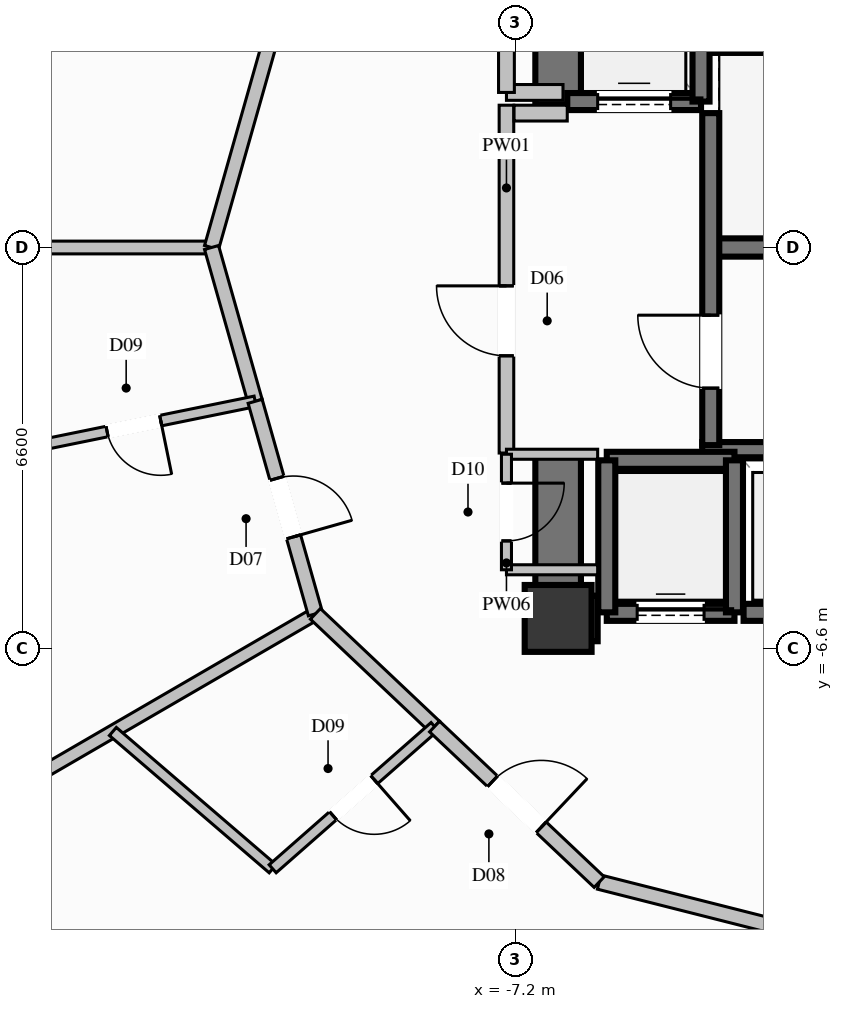
"""IFC4 building model, lengths in metres.
Left out: names, types, materials, properties, quantities, classifications, styles, units other than length and angle.
Written with IfcOpenShell. Run it as: python <this file> out.ifc"""

import sys

from ifc_helpers import new_model, si_unit, direction, frame, frame_2d, origin, origin_2d, place, context, subcontext, project, spatial, rectangle, extrude, element, fill, save


model = new_model("IFC4")
c1 = context("Model", 3, precision=1e-05, world=origin(), true_north=direction((0.0, 1.0)))
c2 = subcontext(c1, "Body", "Model", "MODEL_VIEW")
j1 = project(units=[si_unit("LENGTHUNIT", "METRE"), si_unit("PLANEANGLEUNIT", "RADIAN")], contexts=[c1])
p1 = place(None, origin())
s1 = spatial("IfcSite", under=j1, at=p1, CompositionType="ELEMENT")
p2 = place(p1, origin())
s2 = spatial("IfcBuilding", under=s1, at=p2, CompositionType="ELEMENT")
p3 = place(p2, frame((0.0, 0.0, 42.8)))
s3 = spatial("IfcBuildingStorey", under=s2, at=p3, CompositionType="ELEMENT", Elevation=42.8)
p4 = place(p3, frame((-6.5, -6.1, 0.0), z_axis=(0.0, 0.0, 1.0), x_axis=(1.0, 0.0, 0.0)))
e1 = element("IfcColumn", 1, at=p4, inside=s3, PredefinedType="COLUMN", context=c2, shape_type="SweptSolid", body=[
    extrude(rectangle(XDim=1.1, YDim=1.1, at=origin_2d()), origin(), (0.0, 0.0, 1.0), 3.6),
])
p5 = place(p3, frame((-3.99, 0.0, 0.0), z_axis=(0.0, 0.0, 1.0), x_axis=(1.0, 0.0, 0.0)))
e2 = element("IfcWall", 2, at=p5, inside=s3, PredefinedType="SHEAR", context=c2, shape_type="SweptSolid", body=[
    extrude(rectangle(XDim=7.98, YDim=0.3, at=frame_2d((3.99, 0.0))), origin(), (0.0, 0.0, 1.0), 3.6),
])
for number, where, z_axis, x_axis in (
    (3, (-4.13, -3.325, 0.0), (0.0, 0.0, 1.0), (1.0, 0.0, 0.0)),
    (4, (-4.13, 3.325, 0.0), (0.0, 0.0, 1.0), (1.0, 0.0, 0.0)),
):
    element("IfcWall", number, at=place(p3, frame(where, z_axis=z_axis, x_axis=x_axis)), inside=s3, PredefinedType="SOLIDWALL", context=c2, shape_type="SweptSolid", body=[
        extrude(rectangle(XDim=8.26, YDim=0.25, at=frame_2d((4.13, 0.0))), origin(), (0.0, 0.0, 1.0), 3.6),
    ])
p6 = place(p3, frame((-6.125, -6.1, 0.0), z_axis=(0.0, 0.0, 1.0), x_axis=(1.0, 0.0, 0.0)))
e5 = element("IfcWall", 5, at=p6, inside=s3, PredefinedType="SHEAR", context=c2, shape_type="SweptSolid", body=[
    extrude(rectangle(XDim=0.275, YDim=0.75, at=frame_2d((0.137, 0.0))), origin(), (0.0, 0.0, 1.0), 3.6),
])
p7 = place(p3, frame((-6.5, 2.35, 0.0), z_axis=(0.0, 0.0, 1.0), x_axis=(0.0, 1.0, 0.0)))
e6 = element("IfcWall", 6, at=p7, inside=s3, PredefinedType="SHEAR", context=c2, shape_type="SweptSolid", body=[
    extrude(rectangle(XDim=4.125, YDim=0.75, at=frame_2d((2.062, 0.0))), origin(), (0.0, 0.0, 1.0), 3.6),
])
p8 = place(p3, frame((-6.5, -6.475, 0.0), z_axis=(0.0, 0.0, 1.0), x_axis=(0.0, 1.0, 0.0)))
e7 = element("IfcWall", 7, at=p8, inside=s3, PredefinedType="SHEAR", context=c2, shape_type="SweptSolid", body=[
    extrude(rectangle(XDim=3.125, YDim=0.75, at=frame_2d((1.562, 0.0))), origin(), (0.0, 0.0, 1.0), 3.6),
])
p9 = place(p3, frame((-5.7, -6.0, 0.0), z_axis=(0.0, 0.0, 1.0), x_axis=(1.0, 0.0, 0.0)))
e8 = element("IfcWall", 8, at=p9, inside=s3, PredefinedType="SOLIDWALL", context=c2, shape_type="SweptSolid", body=[
    extrude(rectangle(XDim=2.1, YDim=0.28, at=frame_2d((1.05, 0.0))), origin(), (0.0, 0.0, 1.0), 3.34),
])
p10 = place(p9, frame((0.5, 0.0, 0.0)))
e9 = element("IfcOpeningElement", 9, at=p10, cuts=e8, PredefinedType="OPENING", context=c2, shape_type="SweptSolid", body=[
    extrude(rectangle(XDim=1.1, YDim=2.2, at=frame_2d((0.55, 1.1))), frame((0.0, 0.15, 0.0), z_axis=(0.0, -1.0, 0.0), x_axis=(1.0, 0.0, 0.0)), (0.0, 0.0, 1.0), 0.3),
])
p11 = place(p3, frame((-3.6, -3.5, 0.0), z_axis=(0.0, 0.0, 1.0), x_axis=(-1.0, 0.0, 0.0)))
e10 = element("IfcWall", 10, at=p11, inside=s3, PredefinedType="SOLIDWALL", context=c2, shape_type="SweptSolid", body=[
    extrude(rectangle(XDim=2.1, YDim=0.28, at=frame_2d((1.05, 0.0))), origin(), (0.0, 0.0, 1.0), 3.34),
])
for number, where, z_axis, x_axis in (
    (11, (-5.7, -3.5, 0.0), (0.0, 0.0, 1.0), (0.0, -1.0, 0.0)),
    (12, (-3.6, -6.0, 0.0), (0.0, 0.0, 1.0), (0.0, 1.0, 0.0)),
):
    element("IfcWall", number, at=place(p3, frame(where, z_axis=z_axis, x_axis=x_axis)), inside=s3, PredefinedType="SOLIDWALL", context=c2, shape_type="SweptSolid", body=[
        extrude(rectangle(XDim=2.5, YDim=0.28, at=frame_2d((1.25, 0.0))), origin(), (0.0, 0.0, 1.0), 3.34),
    ])
p12 = place(p3, frame((-3.45, -6.0, 0.0), z_axis=(0.0, 0.0, 1.0), x_axis=(1.0, 0.0, 0.0)))
e13 = element("IfcWall", 13, at=p12, inside=s3, PredefinedType="SOLIDWALL", context=c2, shape_type="SweptSolid", body=[
    extrude(rectangle(XDim=2.1, YDim=0.28, at=frame_2d((1.05, 0.0))), origin(), (0.0, 0.0, 1.0), 3.34),
])
p13 = place(p12, frame((0.5, 0.0, 0.0)))
e14 = element("IfcOpeningElement", 14, at=p13, cuts=e13, PredefinedType="OPENING", context=c2, shape_type="SweptSolid", body=[
    extrude(rectangle(XDim=1.1, YDim=2.2, at=frame_2d((0.55, 1.1))), frame((0.0, 0.15, 0.0), z_axis=(0.0, -1.0, 0.0), x_axis=(1.0, 0.0, 0.0)), (0.0, 0.0, 1.0), 0.3),
])
p14 = place(p3, frame((-6.35, 2.4, 0.0), z_axis=(0.0, 0.0, 1.0), x_axis=(1.0, 0.0, 0.0)))
e15 = element("IfcWall", 15, at=p14, inside=s3, PredefinedType="SOLIDWALL", context=c2, shape_type="SweptSolid", body=[
    extrude(rectangle(XDim=2.2, YDim=0.28, at=frame_2d((1.1, 0.0))), origin(), (0.0, 0.0, 1.0), 3.34),
])
p15 = place(p14, frame((0.5, 0.0, 0.0)))
e16 = element("IfcOpeningElement", 16, at=p15, cuts=e15, PredefinedType="OPENING", context=c2, shape_type="SweptSolid", body=[
    extrude(rectangle(XDim=1.2, YDim=2.2, at=frame_2d((0.6, 1.1))), frame((0.0, 0.15, 0.0), z_axis=(0.0, -1.0, 0.0), x_axis=(1.0, 0.0, 0.0)), (0.0, 0.0, 1.0), 0.3),
])
p16 = place(p3, frame((-4.15, 2.4, 0.0), z_axis=(0.0, 0.0, 1.0), x_axis=(0.0, 1.0, 0.0)))
e17 = element("IfcWall", 17, at=p16, inside=s3, PredefinedType="SOLIDWALL", context=c2, shape_type="SweptSolid", body=[
    extrude(rectangle(XDim=2.7, YDim=0.28, at=frame_2d((1.35, 0.0))), origin(), (0.0, 0.0, 1.0), 3.34),
])
p17 = place(p3, frame((-3.99, -3.25, 0.0), z_axis=(0.0, 0.0, 1.0), x_axis=(0.0, 1.0, 0.0)))
e18 = element("IfcWall", 18, at=p17, inside=s3, PredefinedType="SOLIDWALL", context=c2, shape_type="SweptSolid", body=[
    extrude(rectangle(XDim=5.46, YDim=0.28, at=frame_2d((2.73, 0.0))), origin(), (0.0, 0.0, 1.0), 3.34),
])
p18 = place(p17, frame((0.937, 0.0, 0.0)))
e19 = element("IfcOpeningElement", 19, at=p18, cuts=e18, PredefinedType="OPENING", context=c2, shape_type="SweptSolid", body=[
    extrude(rectangle(XDim=1.2, YDim=2.2, at=frame_2d((0.6, 1.1))), frame((0.0, 0.15, 0.0), z_axis=(0.0, -1.0, 0.0), x_axis=(1.0, 0.0, 0.0)), (0.0, 0.0, 1.0), 0.3),
])
p19 = place(p3, frame((-7.35, -3.38, 0.0), z_axis=(0.0, 0.0, 1.0), x_axis=(0.0, 1.0, 0.0)))
e20 = element("IfcWall", 20, at=p19, inside=s3, PredefinedType="PARTITIONING", context=c2, shape_type="SweptSolid", body=[
    extrude(rectangle(XDim=5.72, YDim=0.24, at=frame_2d((2.86, 0.0))), origin(), (0.0, 0.0, 1.0), 2.425),
])
p20 = place(p19, frame((1.599, 0.0, 0.0)))
e21 = element("IfcOpeningElement", 21, at=p20, cuts=e20, PredefinedType="OPENING", context=c2, shape_type="SweptSolid", body=[
    extrude(rectangle(XDim=1.15, YDim=2.2, at=frame_2d((0.575, 1.1))), frame((0.0, 0.13, 0.0), z_axis=(0.0, -1.0, 0.0), x_axis=(1.0, 0.0, 0.0)), (0.0, 0.0, 1.0), 0.26),
])
p21 = place(p3, frame((-7.225, 2.21, 0.0), z_axis=(0.0, 0.0, 1.0), x_axis=(1.0, 0.0, 0.0)))
e22 = element("IfcWall", 22, at=p21, inside=s3, PredefinedType="PARTITIONING", context=c2, shape_type="SweptSolid", body=[
    extrude(rectangle(XDim=0.875, YDim=0.26, at=frame_2d((0.438, 0.0))), origin(), (0.0, 0.0, 1.0), 3.34),
])
p22 = place(p3, frame((-7.35, 2.55, 0.0), z_axis=(0.0, 0.0, 1.0), x_axis=(1.0, 0.0, 0.0)))
e23 = element("IfcWall", 23, at=p22, inside=s3, PredefinedType="PARTITIONING", context=c2, shape_type="SweptSolid", body=[
    extrude(rectangle(XDim=0.93, YDim=0.26, at=frame_2d((0.465, 0.0))), origin(), (0.0, 0.0, 1.0), 3.34),
])
p23 = place(p3, frame((-7.35, 2.55, 0.0), z_axis=(0.0, 0.0, 1.0), x_axis=(0.0, 1.0, 0.0)))
e24 = element("IfcWall", 24, at=p23, inside=s3, PredefinedType="PARTITIONING", context=c2, shape_type="SweptSolid", body=[
    extrude(rectangle(XDim=2.4, YDim=0.26, at=frame_2d((1.2, 0.0))), origin(), (0.0, 0.0, 1.0), 2.425),
])
p24 = place(p23, frame((0.775, 0.0, 0.0)))
e25 = element("IfcOpeningElement", 25, at=p24, cuts=e24, PredefinedType="OPENING", context=c2, shape_type="SweptSolid", body=[
    extrude(rectangle(XDim=0.85, YDim=2.05, at=frame_2d((0.425, 1.025))), frame((0.0, 0.14, 0.0), z_axis=(0.0, -1.0, 0.0), x_axis=(1.0, 0.0, 0.0)), (0.0, 0.0, 1.0), 0.28),
])
p25 = place(p3, frame((-7.35, -5.3, 0.0), z_axis=(0.0, 0.0, 1.0), x_axis=(1.0, 0.0, 0.0)))
e26 = element("IfcWall", 26, at=p25, inside=s3, PredefinedType="PARTITIONING", context=c2, shape_type="SweptSolid", body=[
    extrude(rectangle(XDim=1.5, YDim=0.165, at=frame_2d((0.75, 0.0))), origin(), (0.0, 0.0, 1.0), 2.425),
])
p26 = place(p3, frame((-5.85, -3.4, 0.0), z_axis=(0.0, 0.0, 1.0), x_axis=(-1.0, 0.0, 0.0)))
e27 = element("IfcWall", 27, at=p26, inside=s3, PredefinedType="PARTITIONING", context=c2, shape_type="SweptSolid", body=[
    extrude(rectangle(XDim=1.5, YDim=0.165, at=frame_2d((0.75, 0.0))), origin(), (0.0, 0.0, 1.0), 3.34),
])
p27 = place(p3, frame((-7.35, -3.4, 0.0), z_axis=(0.0, 0.0, 1.0), x_axis=(0.0, -1.0, 0.0)))
e28 = element("IfcWall", 28, at=p27, inside=s3, PredefinedType="PARTITIONING", context=c2, shape_type="SweptSolid", body=[
    extrude(rectangle(XDim=1.9, YDim=0.165, at=frame_2d((0.95, 0.0))), origin(), (0.0, 0.0, 1.0), 3.34),
])
p28 = place(p27, frame((0.475, 0.0, 0.0)))
e29 = element("IfcOpeningElement", 29, at=p28, cuts=e28, PredefinedType="OPENING", context=c2, shape_type="SweptSolid", body=[
    extrude(rectangle(XDim=0.95, YDim=2.1, at=frame_2d((0.475, 1.05))), frame((0.0, 0.093, 0.0), z_axis=(0.0, -1.0, 0.0), x_axis=(1.0, 0.0, 0.0)), (0.0, 0.0, 1.0), 0.185),
])
p29 = place(p3, frame((-12.2, 0.0, 0.0), z_axis=(0.0, 0.0, 1.0), x_axis=(-1.0, 0.0, 0.0)))
e30 = element("IfcWall", 30, at=p29, inside=s3, PredefinedType="PARTITIONING", context=c2, shape_type="SweptSolid", body=[
    extrude(rectangle(XDim=5.78, YDim=0.21, at=frame_2d((2.89, 0.0))), origin(), (0.0, 0.0, 1.0), 2.708),
])
p30 = place(p3, frame((-10.492, -6.025, 0.0), z_axis=(0.0, 0.0, 1.0), x_axis=(-0.86478894661, -0.502135517387, 0.0)))
e31 = element("IfcWall", 31, at=p30, inside=s3, PredefinedType="PARTITIONING", context=c2, shape_type="SweptSolid", body=[
    extrude(rectangle(XDim=5.881, YDim=0.21, at=frame_2d((2.94, 0.0))), origin(), (0.0, 0.0, 1.0), 2.708),
])
p31 = place(p3, frame((-10.492, 6.025, 0.0), z_axis=(0.0, 0.0, 1.0), x_axis=(-0.272743314702, -0.962086838225, 0.0)))
e32 = element("IfcWall", 32, at=p31, inside=s3, PredefinedType="PARTITIONING", context=c2, shape_type="SweptSolid", body=[
    extrude(rectangle(XDim=6.262, YDim=0.24, at=frame_2d((3.131, 0.0))), origin(), (0.0, 0.0, 1.0), 3.34),
])
p32 = place(p3, frame((-12.2, 0.0, 0.0), z_axis=(0.0, 0.0, 1.0), x_axis=(0.272672757197, -0.962106837873, 0.0)))
e33 = element("IfcWall", 33, at=p32, inside=s3, PredefinedType="PARTITIONING", context=c2, shape_type="SweptSolid", body=[
    extrude(rectangle(XDim=2.63, YDim=0.24, at=frame_2d((1.315, 0.0))), origin(), (0.0, 0.0, 1.0), 3.34),
])
p33 = place(p3, frame((-11.483, -2.53, 0.0), z_axis=(0.0, 0.0, 1.0), x_axis=(-0.979847207533, -0.19974846655, 0.0)))
e34 = element("IfcWall", 34, at=p33, inside=s3, PredefinedType="PLUMBINGWALL", context=c2, shape_type="SweptSolid", body=[
    extrude(rectangle(XDim=4.07, YDim=0.175, at=frame_2d((2.035, 0.0))), origin(), (0.0, 0.0, 1.0), 3.34),
])
p34 = place(p33, frame((1.585, 0.0, 0.0)))
e35 = element("IfcOpeningElement", 35, at=p34, cuts=e34, PredefinedType="OPENING", context=c2, shape_type="SweptSolid", body=[
    extrude(rectangle(XDim=0.9, YDim=2.1, at=frame_2d((0.45, 1.05))), frame((0.0, 0.098, 0.0), z_axis=(0.0, -1.0, 0.0), x_axis=(1.0, 0.0, 0.0)), (0.0, 0.0, 1.0), 0.195),
])
p35 = place(p3, frame((-11.483, -2.53, 0.0), z_axis=(0.0, 0.0, 1.0), x_axis=(0.272794390365, -0.96207235725, 0.0)))
e36 = element("IfcWall", 36, at=p35, inside=s3, PredefinedType="PARTITIONING", context=c2, shape_type="SweptSolid", body=[
    extrude(rectangle(XDim=3.633, YDim=0.24, at=frame_2d((1.816, 0.0))), origin(), (0.0, 0.0, 1.0), 3.34),
])
p36 = place(p35, frame((1.316, 0.0, 0.0)))
e37 = element("IfcOpeningElement", 37, at=p36, cuts=e36, PredefinedType="OPENING", context=c2, shape_type="SweptSolid", body=[
    extrude(rectangle(XDim=1.0, YDim=2.2, at=frame_2d((0.5, 1.1))), frame((0.0, 0.13, 0.0), z_axis=(0.0, -1.0, 0.0), x_axis=(1.0, 0.0, 0.0)), (0.0, 0.0, 1.0), 0.26),
])
p37 = place(p3, frame((-10.492, -6.025, 0.0), z_axis=(0.0, 0.0, 1.0), x_axis=(0.726651583854, -0.687006168591, 0.0)))
e38 = element("IfcWall", 38, at=p37, inside=s3, PredefinedType="PARTITIONING", context=c2, shape_type="SweptSolid", body=[
    extrude(rectangle(XDim=2.697, YDim=0.24, at=frame_2d((1.349, 0.0))), origin(), (0.0, 0.0, 1.0), 3.34),
])
p38 = place(p3, frame((-13.823, -7.959, 0.0), z_axis=(0.0, 0.0, 1.0), x_axis=(0.758465196679, -0.65171354553, 0.0)))
e39 = element("IfcWall", 39, at=p38, inside=s3, PredefinedType="PLUMBINGWALL", context=c2, shape_type="SweptSolid", body=[
    extrude(rectangle(XDim=3.465, YDim=0.175, at=frame_2d((1.732, 0.0))), origin(), (0.0, 0.0, 1.0), 3.34),
])
p39 = place(p3, frame((-8.532, -7.878, 0.0), z_axis=(0.0, 0.0, 1.0), x_axis=(-0.751329434658, -0.6599273298, 0.0)))
e40 = element("IfcWall", 40, at=p39, inside=s3, PredefinedType="PLUMBINGWALL", context=c2, shape_type="SweptSolid", body=[
    extrude(rectangle(XDim=3.544, YDim=0.175, at=frame_2d((1.772, 0.0))), origin(), (0.0, 0.0, 1.0), 3.34),
])
p40 = place(p39, frame((1.322, 0.0, 0.0)))
e41 = element("IfcOpeningElement", 41, at=p40, cuts=e40, PredefinedType="OPENING", context=c2, shape_type="SweptSolid", body=[
    extrude(rectangle(XDim=0.9, YDim=2.1, at=frame_2d((0.45, 1.05))), frame((0.0, 0.098, 0.0), z_axis=(0.0, -1.0, 0.0), x_axis=(1.0, 0.0, 0.0)), (0.0, 0.0, 1.0), 0.195),
])
p41 = place(p3, frame((-5.825, -10.436, 0.0), z_axis=(0.0, 0.0, 1.0), x_axis=(0.969413132073, -0.245434674331, 0.0)))
e42 = element("IfcWall", 42, at=p41, inside=s3, PredefinedType="PARTITIONING", context=c2, shape_type="SweptSolid", body=[
    extrude(rectangle(XDim=6.576, YDim=0.24, at=frame_2d((3.288, 0.0))), origin(), (0.0, 0.0, 1.0), 2.918),
])
p42 = place(p3, frame((-8.532, -7.878, 0.0), z_axis=(0.0, 0.0, 1.0), x_axis=(0.726816794063, -0.686831382413, 0.0)))
e43 = element("IfcWall", 43, at=p42, inside=s3, PredefinedType="PARTITIONING", context=c2, shape_type="SweptSolid", body=[
    extrude(rectangle(XDim=3.725, YDim=0.24, at=frame_2d((1.862, 0.0))), origin(), (0.0, 0.0, 1.0), 3.34),
])
p43 = place(p42, frame((1.312, 0.0, 0.0)))
e44 = element("IfcOpeningElement", 44, at=p43, cuts=e43, PredefinedType="OPENING", context=c2, shape_type="SweptSolid", body=[
    extrude(rectangle(XDim=1.1, YDim=2.3, at=frame_2d((0.55, 1.15))), frame((0.0, 0.13, 0.0), z_axis=(0.0, -1.0, 0.0), x_axis=(1.0, 0.0, 0.0)), (0.0, 0.0, 1.0), 0.26),
])
p44 = place(p3, frame((-17.644, -10.178, 0.0), z_axis=(0.0, 0.0, 1.0), x_axis=(0.780247491349, -0.625470904394, 0.0)))
e45 = element("IfcWall", 45, at=p44, inside=s3, PredefinedType="PARTITIONING", context=c2, shape_type="SweptSolid", body=[
    extrude(rectangle(XDim=10.357, YDim=0.135, at=frame_2d((5.178, 0.0))), origin(), (0.0, 0.0, 1.0), 2.791),
])
p45 = place(p44, frame((4.703, 0.0, 0.0)))
e46 = element("IfcOpeningElement", 46, at=p45, cuts=e45, PredefinedType="OPENING", context=c2, shape_type="SweptSolid", body=[
    extrude(rectangle(XDim=0.95, YDim=2.1, at=frame_2d((0.475, 1.05))), frame((0.0, 0.078, 0.0), z_axis=(0.0, -1.0, 0.0), x_axis=(1.0, 0.0, 0.0)), (0.0, 0.0, 1.0), 0.155),
])
p46 = place(p10, origin())
e47 = element("IfcDoor", 47, at=p46, inside=s3, OperationType="SLIDING_TO_LEFT", PredefinedType="DOOR", context=c2, shape_type="SweptSolid", body=[
    extrude(rectangle(XDim=1.1, YDim=2.2, at=frame_2d((0.55, 1.1))), frame((0.0, 0.025, 0.0), z_axis=(0.0, -1.0, 0.0), x_axis=(1.0, 0.0, 0.0)), (0.0, 0.0, 1.0), 0.05),
])
fill(e9, e47)
p47 = place(p15, origin())
e48 = element("IfcDoor", 48, at=p47, inside=s3, OperationType="SLIDING_TO_LEFT", PredefinedType="DOOR", context=c2, shape_type="SweptSolid", body=[
    extrude(rectangle(XDim=1.2, YDim=2.2, at=frame_2d((0.6, 1.1))), frame((0.0, 0.025, 0.0), z_axis=(0.0, -1.0, 0.0), x_axis=(1.0, 0.0, 0.0)), (0.0, 0.0, 1.0), 0.05),
])
fill(e16, e48)
p48 = place(p18, origin())
e49 = element("IfcDoor", 49, at=p48, inside=s3, OperationType="SINGLE_SWING_RIGHT", PredefinedType="DOOR", context=c2, shape_type="SweptSolid", body=[
    extrude(rectangle(XDim=1.2, YDim=2.2, at=frame_2d((0.6, 1.1))), frame((0.0, 0.025, 0.0), z_axis=(0.0, -1.0, 0.0), x_axis=(1.0, 0.0, 0.0)), (0.0, 0.0, 1.0), 0.05),
])
fill(e19, e49)
p49 = place(p20, origin())
e50 = element("IfcDoor", 50, at=p49, inside=s3, OperationType="SINGLE_SWING_RIGHT", PredefinedType="DOOR", context=c2, shape_type="SweptSolid", body=[
    extrude(rectangle(XDim=1.15, YDim=2.2, at=frame_2d((0.575, 1.1))), frame((0.0, 0.025, 0.0), z_axis=(0.0, -1.0, 0.0), x_axis=(1.0, 0.0, 0.0)), (0.0, 0.0, 1.0), 0.05),
])
fill(e21, e50)
p50 = place(p28, origin())
e51 = element("IfcDoor", 51, at=p50, inside=s3, OperationType="SINGLE_SWING_LEFT", PredefinedType="DOOR", context=c2, shape_type="SweptSolid", body=[
    extrude(rectangle(XDim=0.95, YDim=2.1, at=frame_2d((0.475, 1.05))), frame((0.0, 0.025, 0.0), z_axis=(0.0, -1.0, 0.0), x_axis=(1.0, 0.0, 0.0)), (0.0, 0.0, 1.0), 0.05),
])
fill(e29, e51)
p51 = place(p34, origin())
e52 = element("IfcDoor", 52, at=p51, inside=s3, OperationType="SINGLE_SWING_LEFT", PredefinedType="DOOR", context=c2, shape_type="SweptSolid", body=[
    extrude(rectangle(XDim=0.9, YDim=2.1, at=frame_2d((0.45, 1.05))), frame((0.0, 0.025, 0.0), z_axis=(0.0, -1.0, 0.0), x_axis=(1.0, 0.0, 0.0)), (0.0, 0.0, 1.0), 0.05),
])
fill(e35, e52)
p52 = place(p36, origin())
e53 = element("IfcDoor", 53, at=p52, inside=s3, OperationType="SINGLE_SWING_RIGHT", PredefinedType="DOOR", context=c2, shape_type="SweptSolid", body=[
    extrude(rectangle(XDim=1.0, YDim=2.2, at=frame_2d((0.5, 1.1))), frame((0.0, 0.025, 0.0), z_axis=(0.0, -1.0, 0.0), x_axis=(1.0, 0.0, 0.0)), (0.0, 0.0, 1.0), 0.05),
])
fill(e37, e53)
p53 = place(p40, origin())
e54 = element("IfcDoor", 54, at=p53, inside=s3, OperationType="SINGLE_SWING_LEFT", PredefinedType="DOOR", context=c2, shape_type="SweptSolid", body=[
    extrude(rectangle(XDim=0.9, YDim=2.1, at=frame_2d((0.45, 1.05))), frame((0.0, 0.025, 0.0), z_axis=(0.0, -1.0, 0.0), x_axis=(1.0, 0.0, 0.0)), (0.0, 0.0, 1.0), 0.05),
])
fill(e41, e54)
p54 = place(p43, origin())
e55 = element("IfcDoor", 55, at=p54, inside=s3, OperationType="SINGLE_SWING_RIGHT", PredefinedType="DOOR", context=c2, shape_type="SweptSolid", body=[
    extrude(rectangle(XDim=1.1, YDim=2.3, at=frame_2d((0.55, 1.15))), frame((0.0, 0.025, 0.0), z_axis=(0.0, -1.0, 0.0), x_axis=(1.0, 0.0, 0.0)), (0.0, 0.0, 1.0), 0.05),
])
fill(e44, e55)
save(model, sys.argv[1])
